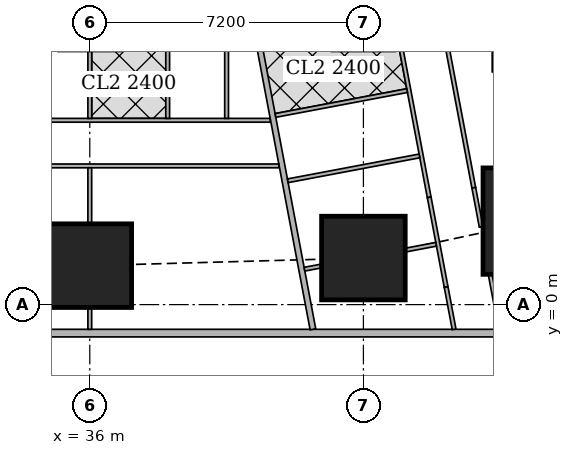
"""IFC4 building model, lengths in metres.
Left out: names, types, materials, properties, quantities, classifications, styles, units other than length and angle.
Written with IfcOpenShell. Run it as: python <this file> out.ifc"""

import sys

from ifc_helpers import new_model, si_unit, direction, frame, frame_2d, origin, origin_2d, place, context, subcontext, project, spatial, rectangle, extrude, element, fill, save


model = new_model("IFC4")
c1 = context("Model", 3, precision=1e-05, world=origin(), true_north=direction((0.0, 1.0)))
c2 = subcontext(c1, "Body", "Model", "MODEL_VIEW")
j1 = project(units=[si_unit("LENGTHUNIT", "METRE"), si_unit("PLANEANGLEUNIT", "RADIAN")], contexts=[c1])
p1 = place(None, origin())
s1 = spatial("IfcSite", under=j1, at=p1, CompositionType="ELEMENT")
p2 = place(p1, origin())
s2 = spatial("IfcBuilding", under=s1, at=p2, CompositionType="ELEMENT")
p3 = place(p2, frame((0.0, 0.0, 111.65)))
s3 = spatial("IfcBuildingStorey", under=s2, at=p3, CompositionType="ELEMENT", Elevation=111.65)
for number, where, z_axis, x_axis in (
    (1, (36.0, 1.025, 0.0), (0.0, 0.0, 1.0), (1.0, 0.0, 0.0)),
    (2, (43.2, 1.225, 0.0), (0.0, 0.0, 1.0), (1.0, 0.0, 0.0)),
):
    element("IfcColumn", number, at=place(p3, frame(where, z_axis=z_axis, x_axis=x_axis)), inside=s3, PredefinedType="COLUMN", context=c2, shape_type="SweptSolid", body=[
        extrude(rectangle(XDim=2.2, YDim=2.2, at=origin_2d()), origin(), (0.0, 0.0, 1.0), 3.75),
    ])
p4 = place(p3, frame((47.748, 2.197, 0.0), z_axis=(0.0, 0.0, 1.0), x_axis=(1.0, 0.0, 0.0)))
e3 = element("IfcColumn", 3, at=p4, inside=s3, PredefinedType="COLUMN", context=c2, shape_type="SweptSolid", body=[
    extrude(rectangle(XDim=2.8, YDim=2.8, at=origin_2d()), origin(), (0.0, 0.0, 1.0), 3.75),
])
p5 = place(p3, frame((2.163, -0.75, 0.0), z_axis=(0.0, 0.0, 1.0), x_axis=(1.0, 0.0, 0.0)))
e4 = element("IfcWall", 4, at=p5, inside=s3, PredefinedType="SOLIDWALL", context=c2, shape_type="SweptSolid", body=[
    extrude(rectangle(XDim=45.628, YDim=0.2, at=frame_2d((22.814, 0.0))), origin(), (0.0, 0.0, 1.0), 3.5),
])
p6 = place(p5, frame((9.537, 0.0, 0.9)))
e5 = element("IfcOpeningElement", 5, at=p6, cuts=e4, PredefinedType="OPENING", context=c2, shape_type="SweptSolid", body=[
    extrude(rectangle(XDim=1.8, YDim=1.5, at=frame_2d((0.9, 0.75))), frame((0.0, 0.11, 0.0), z_axis=(0.0, -1.0, 0.0), x_axis=(1.0, 0.0, 0.0)), (0.0, 0.0, 1.0), 0.22),
])
p7 = place(p5, frame((13.137, 0.0, 0.9)))
e6 = element("IfcOpeningElement", 6, at=p7, cuts=e4, PredefinedType="OPENING", context=c2, shape_type="SweptSolid", body=[
    extrude(rectangle(XDim=1.8, YDim=1.5, at=frame_2d((0.9, 0.75))), frame((0.0, 0.11, 0.0), z_axis=(0.0, -1.0, 0.0), x_axis=(1.0, 0.0, 0.0)), (0.0, 0.0, 1.0), 0.22),
])
p8 = place(p5, frame((16.737, 0.0, 0.9)))
e7 = element("IfcOpeningElement", 7, at=p8, cuts=e4, PredefinedType="OPENING", context=c2, shape_type="SweptSolid", body=[
    extrude(rectangle(XDim=1.8, YDim=1.5, at=frame_2d((0.9, 0.75))), frame((0.0, 0.11, 0.0), z_axis=(0.0, -1.0, 0.0), x_axis=(1.0, 0.0, 0.0)), (0.0, 0.0, 1.0), 0.22),
])
p9 = place(p5, frame((20.337, 0.0, 0.9)))
e8 = element("IfcOpeningElement", 8, at=p9, cuts=e4, PredefinedType="OPENING", context=c2, shape_type="SweptSolid", body=[
    extrude(rectangle(XDim=1.8, YDim=1.5, at=frame_2d((0.9, 0.75))), frame((0.0, 0.11, 0.0), z_axis=(0.0, -1.0, 0.0), x_axis=(1.0, 0.0, 0.0)), (0.0, 0.0, 1.0), 0.22),
])
p10 = place(p5, frame((23.937, 0.0, 0.9)))
e9 = element("IfcOpeningElement", 9, at=p10, cuts=e4, PredefinedType="OPENING", context=c2, shape_type="SweptSolid", body=[
    extrude(rectangle(XDim=1.8, YDim=1.5, at=frame_2d((0.9, 0.75))), frame((0.0, 0.11, 0.0), z_axis=(0.0, -1.0, 0.0), x_axis=(1.0, 0.0, 0.0)), (0.0, 0.0, 1.0), 0.22),
])
p11 = place(p5, frame((27.537, 0.0, 0.9)))
e10 = element("IfcOpeningElement", 10, at=p11, cuts=e4, PredefinedType="OPENING", context=c2, shape_type="SweptSolid", body=[
    extrude(rectangle(XDim=1.8, YDim=1.5, at=frame_2d((0.9, 0.75))), frame((0.0, 0.11, 0.0), z_axis=(0.0, -1.0, 0.0), x_axis=(1.0, 0.0, 0.0)), (0.0, 0.0, 1.0), 0.22),
])
p12 = place(p5, frame((31.137, 0.0, 0.9)))
e11 = element("IfcOpeningElement", 11, at=p12, cuts=e4, PredefinedType="OPENING", context=c2, shape_type="SweptSolid", body=[
    extrude(rectangle(XDim=1.8, YDim=1.5, at=frame_2d((0.9, 0.75))), frame((0.0, 0.11, 0.0), z_axis=(0.0, -1.0, 0.0), x_axis=(1.0, 0.0, 0.0)), (0.0, 0.0, 1.0), 0.22),
])
p13 = place(p5, frame((34.737, 0.0, 0.9)))
e12 = element("IfcOpeningElement", 12, at=p13, cuts=e4, PredefinedType="OPENING", context=c2, shape_type="SweptSolid", body=[
    extrude(rectangle(XDim=1.8, YDim=1.5, at=frame_2d((0.9, 0.75))), frame((0.0, 0.11, 0.0), z_axis=(0.0, -1.0, 0.0), x_axis=(1.0, 0.0, 0.0)), (0.0, 0.0, 1.0), 0.22),
])
p14 = place(p3, frame((50.653, 2.703, 0.0), z_axis=(0.0, 0.0, 1.0), x_axis=(-0.185612026696, 0.982623109613, 0.0)))
e13 = element("IfcWall", 13, at=p14, inside=s3, PredefinedType="SOLIDWALL", context=c2, shape_type="SweptSolid", body=[
    extrude(rectangle(XDim=41.393, YDim=0.2, at=frame_2d((20.697, 0.0))), origin(), (0.0, 0.0, 1.0), 3.5),
])
p15 = place(p14, frame((1.633, 0.0, 0.9)))
e14 = element("IfcOpeningElement", 14, at=p15, cuts=e13, PredefinedType="OPENING", context=c2, shape_type="SweptSolid", body=[
    extrude(rectangle(XDim=1.8, YDim=1.5, at=frame_2d((0.9, 0.75))), frame((0.0, 0.11, 0.0), z_axis=(0.0, -1.0, 0.0), x_axis=(1.0, 0.0, 0.0)), (0.0, 0.0, 1.0), 0.22),
])
p16 = place(p14, frame((6.032, 0.0, 0.9)))
e15 = element("IfcOpeningElement", 15, at=p16, cuts=e13, PredefinedType="OPENING", context=c2, shape_type="SweptSolid", body=[
    extrude(rectangle(XDim=1.8, YDim=1.5, at=frame_2d((0.9, 0.75))), frame((0.0, 0.11, 0.0), z_axis=(0.0, -1.0, 0.0), x_axis=(1.0, 0.0, 0.0)), (0.0, 0.0, 1.0), 0.22),
])
p17 = place(p14, frame((9.848, 0.0, 0.9)))
e16 = element("IfcOpeningElement", 16, at=p17, cuts=e13, PredefinedType="OPENING", context=c2, shape_type="SweptSolid", body=[
    extrude(rectangle(XDim=1.8, YDim=1.5, at=frame_2d((0.9, 0.75))), frame((0.0, 0.11, 0.0), z_axis=(0.0, -1.0, 0.0), x_axis=(1.0, 0.0, 0.0)), (0.0, 0.0, 1.0), 0.22),
])
p18 = place(p14, frame((13.664, 0.0, 0.9)))
e17 = element("IfcOpeningElement", 17, at=p18, cuts=e13, PredefinedType="OPENING", context=c2, shape_type="SweptSolid", body=[
    extrude(rectangle(XDim=1.8, YDim=1.5, at=frame_2d((0.9, 0.75))), frame((0.0, 0.11, 0.0), z_axis=(0.0, -1.0, 0.0), x_axis=(1.0, 0.0, 0.0)), (0.0, 0.0, 1.0), 0.22),
])
p19 = place(p14, frame((17.481, 0.0, 0.9)))
e18 = element("IfcOpeningElement", 18, at=p19, cuts=e13, PredefinedType="OPENING", context=c2, shape_type="SweptSolid", body=[
    extrude(rectangle(XDim=1.8, YDim=1.5, at=frame_2d((0.9, 0.75))), frame((0.0, 0.11, 0.0), z_axis=(0.0, -1.0, 0.0), x_axis=(1.0, 0.0, 0.0)), (0.0, 0.0, 1.0), 0.22),
])
p20 = place(p14, frame((21.297, 0.0, 0.9)))
e19 = element("IfcOpeningElement", 19, at=p20, cuts=e13, PredefinedType="OPENING", context=c2, shape_type="SweptSolid", body=[
    extrude(rectangle(XDim=1.8, YDim=1.5, at=frame_2d((0.9, 0.75))), frame((0.0, 0.11, 0.0), z_axis=(0.0, -1.0, 0.0), x_axis=(1.0, 0.0, 0.0)), (0.0, 0.0, 1.0), 0.22),
])
p21 = place(p14, frame((25.113, 0.0, 0.9)))
e20 = element("IfcOpeningElement", 20, at=p21, cuts=e13, PredefinedType="OPENING", context=c2, shape_type="SweptSolid", body=[
    extrude(rectangle(XDim=1.8, YDim=1.5, at=frame_2d((0.9, 0.75))), frame((0.0, 0.11, 0.0), z_axis=(0.0, -1.0, 0.0), x_axis=(1.0, 0.0, 0.0)), (0.0, 0.0, 1.0), 0.22),
])
p22 = place(p14, frame((28.93, 0.0, 0.9)))
e21 = element("IfcOpeningElement", 21, at=p22, cuts=e13, PredefinedType="OPENING", context=c2, shape_type="SweptSolid", body=[
    extrude(rectangle(XDim=1.8, YDim=1.5, at=frame_2d((0.9, 0.75))), frame((0.0, 0.11, 0.0), z_axis=(0.0, -1.0, 0.0), x_axis=(1.0, 0.0, 0.0)), (0.0, 0.0, 1.0), 0.22),
])
p23 = place(p14, frame((32.746, 0.0, 0.9)))
e22 = element("IfcOpeningElement", 22, at=p23, cuts=e13, PredefinedType="OPENING", context=c2, shape_type="SweptSolid", body=[
    extrude(rectangle(XDim=1.8, YDim=1.5, at=frame_2d((0.9, 0.75))), frame((0.0, 0.11, 0.0), z_axis=(0.0, -1.0, 0.0), x_axis=(1.0, 0.0, 0.0)), (0.0, 0.0, 1.0), 0.22),
])
p24 = place(p14, frame((36.481, 0.0, 0.9)))
e23 = element("IfcOpeningElement", 23, at=p24, cuts=e13, PredefinedType="OPENING", context=c2, shape_type="SweptSolid", body=[
    extrude(rectangle(XDim=1.8, YDim=1.5, at=frame_2d((0.9, 0.75))), frame((0.0, 0.11, 0.0), z_axis=(0.0, -1.0, 0.0), x_axis=(1.0, 0.0, 0.0)), (0.0, 0.0, 1.0), 0.22),
])
p25 = place(p3, frame((33.127, 45.65, 0.0), z_axis=(0.0, 0.0, 1.0), x_axis=(0.185598547723, -0.98262565562, 0.0)))
e24 = element("IfcWall", 24, at=p25, inside=s3, PredefinedType="SOLIDWALL", context=c2, shape_type="SweptSolid", body=[
    extrude(rectangle(XDim=47.118, YDim=0.15, at=frame_2d((23.559, 0.0))), origin(), (0.0, 0.0, 1.0), 2.2),
])
p26 = place(p25, frame((20.373, 0.0, 0.0)))
e25 = element("IfcOpeningElement", 25, at=p26, cuts=e24, PredefinedType="OPENING", context=c2, shape_type="SweptSolid", body=[
    extrude(rectangle(XDim=1.0, YDim=2.1, at=frame_2d((0.5, 1.05))), frame((0.0, 0.085, 0.0), z_axis=(0.0, -1.0, 0.0), x_axis=(1.0, 0.0, 0.0)), (0.0, 0.0, 1.0), 0.17),
])
p27 = place(p25, frame((24.188, 0.0, 0.0)))
e26 = element("IfcOpeningElement", 26, at=p27, cuts=e24, PredefinedType="OPENING", context=c2, shape_type="SweptSolid", body=[
    extrude(rectangle(XDim=1.0, YDim=2.1, at=frame_2d((0.5, 1.05))), frame((0.0, 0.085, 0.0), z_axis=(0.0, -1.0, 0.0), x_axis=(1.0, 0.0, 0.0)), (0.0, 0.0, 1.0), 0.17),
])
p28 = place(p25, frame((32.608, 0.0, 0.0)))
e27 = element("IfcOpeningElement", 27, at=p28, cuts=e24, PredefinedType="OPENING", context=c2, shape_type="SweptSolid", body=[
    extrude(rectangle(XDim=1.0, YDim=2.1, at=frame_2d((0.5, 1.05))), frame((0.0, 0.085, 0.0), z_axis=(0.0, -1.0, 0.0), x_axis=(1.0, 0.0, 0.0)), (0.0, 0.0, 1.0), 0.17),
])
p29 = place(p3, frame((40.974, 3.65, 0.0), z_axis=(0.0, 0.0, 1.0), x_axis=(-1.0, 0.0, 0.0)))
e28 = element("IfcWall", 28, at=p29, inside=s3, PredefinedType="PARTITIONING", context=c2, shape_type="SweptSolid", body=[
    extrude(rectangle(XDim=8.574, YDim=0.1, at=frame_2d((4.287, 0.0))), origin(), (0.0, 0.0, 1.0), 3.5),
])
p30 = place(p29, frame((6.275, 0.0, 0.0)))
e29 = element("IfcOpeningElement", 29, at=p30, cuts=e28, PredefinedType="OPENING", context=c2, shape_type="SweptSolid", body=[
    extrude(rectangle(XDim=0.9, YDim=2.1, at=frame_2d((0.45, 1.05))), frame((0.0, 0.06, 0.0), z_axis=(0.0, -1.0, 0.0), x_axis=(1.0, 0.0, 0.0)), (0.0, 0.0, 1.0), 0.12),
])
p31 = place(p29, frame((3.874, 0.0, 0.0)))
e30 = element("IfcOpeningElement", 30, at=p31, cuts=e28, PredefinedType="OPENING", context=c2, shape_type="SweptSolid", body=[
    extrude(rectangle(XDim=0.9, YDim=2.1, at=frame_2d((0.45, 1.05))), frame((0.0, 0.06, 0.0), z_axis=(0.0, -1.0, 0.0), x_axis=(1.0, 0.0, 0.0)), (0.0, 0.0, 1.0), 0.12),
])
p32 = place(p3, frame((40.747, 4.85, 0.0), z_axis=(0.0, 0.0, 1.0), x_axis=(-1.0, 0.0, 0.0)))
e31 = element("IfcWall", 31, at=p32, inside=s3, PredefinedType="PARTITIONING", context=c2, shape_type="SweptSolid", body=[
    extrude(rectangle(XDim=7.148, YDim=0.1, at=frame_2d((3.574, 0.0))), origin(), (0.0, 0.0, 1.0), 3.5),
])
p33 = place(p32, frame((5.498, 0.0, 0.0)))
e32 = element("IfcOpeningElement", 32, at=p33, cuts=e31, PredefinedType="OPENING", context=c2, shape_type="SweptSolid", body=[
    extrude(rectangle(XDim=0.9, YDim=2.1, at=frame_2d((0.45, 1.05))), frame((0.0, 0.06, 0.0), z_axis=(0.0, -1.0, 0.0), x_axis=(1.0, 0.0, 0.0)), (0.0, 0.0, 1.0), 0.12),
])
p34 = place(p32, frame((3.272, 0.0, 0.0)))
e33 = element("IfcOpeningElement", 33, at=p34, cuts=e31, PredefinedType="OPENING", context=c2, shape_type="SweptSolid", body=[
    extrude(rectangle(XDim=0.9, YDim=2.1, at=frame_2d((0.45, 1.05))), frame((0.0, 0.06, 0.0), z_axis=(0.0, -1.0, 0.0), x_axis=(1.0, 0.0, 0.0)), (0.0, 0.0, 1.0), 0.12),
])
p35 = place(p32, frame((0.15, 0.0, 0.0)))
e34 = element("IfcOpeningElement", 34, at=p35, cuts=e31, PredefinedType="OPENING", context=c2, shape_type="SweptSolid", body=[
    extrude(rectangle(XDim=0.9, YDim=2.1, at=frame_2d((0.45, 1.05))), frame((0.0, 0.06, 0.0), z_axis=(0.0, -1.0, 0.0), x_axis=(1.0, 0.0, 0.0)), (0.0, 0.0, 1.0), 0.12),
])
p36 = place(p32, frame((1.472, 0.0, 0.0)))
e35 = element("IfcOpeningElement", 35, at=p36, cuts=e31, PredefinedType="OPENING", context=c2, shape_type="SweptSolid", body=[
    extrude(rectangle(XDim=0.9, YDim=2.1, at=frame_2d((0.45, 1.05))), frame((0.0, 0.06, 0.0), z_axis=(0.0, -1.0, 0.0), x_axis=(1.0, 0.0, 0.0)), (0.0, 0.0, 1.0), 0.12),
])
p37 = place(p3, frame((36.0, -0.65, 0.0), z_axis=(0.0, 0.0, 1.0), x_axis=(0.0, 1.0, 0.0)))
e36 = element("IfcWall", 36, at=p37, inside=s3, PredefinedType="PARTITIONING", context=c2, shape_type="SweptSolid", body=[
    extrude(rectangle(XDim=0.574, YDim=0.1, at=frame_2d((0.287, 0.0))), origin(), (0.0, 0.0, 1.0), 3.5),
])
p38 = place(p3, frame((36.0, 2.126, 0.0), z_axis=(0.0, 0.0, 1.0), x_axis=(0.0, 1.0, 0.0)))
e37 = element("IfcWall", 37, at=p38, inside=s3, PredefinedType="PARTITIONING", context=c2, shape_type="SweptSolid", body=[
    extrude(rectangle(XDim=1.474, YDim=0.1, at=frame_2d((0.737, 0.0))), origin(), (0.0, 0.0, 1.0), 3.5),
])
p39 = place(p3, frame((36.0, 4.9, 0.0), z_axis=(0.0, 0.0, 1.0), x_axis=(0.0, 1.0, 0.0)))
e38 = element("IfcWall", 38, at=p39, inside=s3, PredefinedType="PARTITIONING", context=c2, shape_type="SweptSolid", body=[
    extrude(rectangle(XDim=1.799, YDim=0.1, at=frame_2d((0.899, 0.0))), origin(), (0.0, 0.0, 1.0), 3.5),
])
for number, where, z_axis, x_axis in (
    (39, (39.6, 4.9, 0.0), (0.0, 0.0, 1.0), (0.0, 1.0, 0.0)),
    (40, (38.05, 4.9, 0.0), (0.0, 0.0, 1.0), (0.0, 1.0, 0.0)),
):
    element("IfcWall", number, at=place(p3, frame(where, z_axis=z_axis, x_axis=x_axis)), inside=s3, PredefinedType="PARTITIONING", context=c2, shape_type="SweptSolid", body=[
        extrude(rectangle(XDim=3.525, YDim=0.1, at=frame_2d((1.763, 0.0))), origin(), (0.0, 0.0, 1.0), 3.5),
    ])
p40 = place(p3, frame((44.08, 13.794, 0.0), z_axis=(0.0, 0.0, 1.0), x_axis=(0.185608455357, -0.982623784212, 0.0)))
e41 = element("IfcWall", 41, at=p40, inside=s3, PredefinedType="PARTITIONING", context=c2, shape_type="SweptSolid", body=[
    extrude(rectangle(XDim=10.909, YDim=0.1, at=frame_2d((5.455, 0.0))), origin(), (0.0, 0.0, 1.0), 3.5),
])
p41 = place(p40, frame((1.094, 0.0, 0.0)))
e42 = element("IfcOpeningElement", 42, at=p41, cuts=e41, PredefinedType="OPENING", context=c2, shape_type="SweptSolid", body=[
    extrude(rectangle(XDim=0.9, YDim=2.1, at=frame_2d((0.45, 1.05))), frame((0.0, 0.06, 0.0), z_axis=(0.0, -1.0, 0.0), x_axis=(1.0, 0.0, 0.0)), (0.0, 0.0, 1.0), 0.12),
])
p42 = place(p40, frame((3.639, 0.0, 0.0)))
e43 = element("IfcOpeningElement", 43, at=p42, cuts=e41, PredefinedType="OPENING", context=c2, shape_type="SweptSolid", body=[
    extrude(rectangle(XDim=0.9, YDim=2.1, at=frame_2d((0.45, 1.05))), frame((0.0, 0.06, 0.0), z_axis=(0.0, -1.0, 0.0), x_axis=(1.0, 0.0, 0.0)), (0.0, 0.0, 1.0), 0.12),
])
p43 = place(p40, frame((8.05, 0.0, 0.0)))
e44 = element("IfcOpeningElement", 44, at=p43, cuts=e41, PredefinedType="OPENING", context=c2, shape_type="SweptSolid", body=[
    extrude(rectangle(XDim=0.9, YDim=2.1, at=frame_2d((0.45, 1.05))), frame((0.0, 0.06, 0.0), z_axis=(0.0, -1.0, 0.0), x_axis=(1.0, 0.0, 0.0)), (0.0, 0.0, 1.0), 0.12),
])
p44 = place(p3, frame((46.105, 3.074, 0.0), z_axis=(0.0, 0.0, 1.0), x_axis=(0.185727077805, -0.982601370124, 0.0)))
e45 = element("IfcWall", 45, at=p44, inside=s3, PredefinedType="PARTITIONING", context=c2, shape_type="SweptSolid", body=[
    extrude(rectangle(XDim=1.045, YDim=0.1, at=frame_2d((0.522, 0.0))), origin(), (0.0, 0.0, 1.0), 2.05),
])
p45 = place(p3, frame((46.537, 0.787, 0.0), z_axis=(0.0, 0.0, 1.0), x_axis=(0.1853166059, -0.982678866964, 0.0)))
e46 = element("IfcWall", 46, at=p45, inside=s3, PredefinedType="PARTITIONING", context=c2, shape_type="SweptSolid", body=[
    extrude(rectangle(XDim=1.462, YDim=0.1, at=frame_2d((0.731, 0.0))), origin(), (0.0, 0.0, 1.0), 2.05),
])
p46 = place(p3, frame((44.049, 7.491, 0.0), z_axis=(0.0, 0.0, 1.0), x_axis=(0.185628828844, -0.982619935632, 0.0)))
e47 = element("IfcWall", 47, at=p46, inside=s3, PredefinedType="PARTITIONING", context=c2, shape_type="SweptSolid", body=[
    extrude(rectangle(XDim=4.75, YDim=0.1, at=frame_2d((2.375, 0.0))), origin(), (0.0, 0.0, 1.0), 3.5),
])
p47 = place(p46, frame((0.8, 0.0, 0.0)))
e48 = element("IfcOpeningElement", 48, at=p47, cuts=e47, PredefinedType="OPENING", context=c2, shape_type="SweptSolid", body=[
    extrude(rectangle(XDim=0.9, YDim=2.1, at=frame_2d((0.45, 1.05))), frame((0.0, 0.06, 0.0), z_axis=(0.0, -1.0, 0.0), x_axis=(1.0, 0.0, 0.0)), (0.0, 0.0, 1.0), 0.12),
])
p48 = place(p46, frame((2.316, 0.0, 0.0)))
e49 = element("IfcOpeningElement", 49, at=p48, cuts=e47, PredefinedType="OPENING", context=c2, shape_type="SweptSolid", body=[
    extrude(rectangle(XDim=0.9, YDim=2.1, at=frame_2d((0.45, 1.05))), frame((0.0, 0.06, 0.0), z_axis=(0.0, -1.0, 0.0), x_axis=(1.0, 0.0, 0.0)), (0.0, 0.0, 1.0), 0.12),
])
p49 = place(p3, frame((44.931, 2.823, 0.0), z_axis=(0.0, 0.0, 1.0), x_axis=(0.185631845838, -0.982619365681, 0.0)))
e50 = element("IfcWall", 50, at=p49, inside=s3, PredefinedType="PARTITIONING", context=c2, shape_type="SweptSolid", body=[
    extrude(rectangle(XDim=2.403, YDim=0.1, at=frame_2d((1.201, 0.0))), origin(), (0.0, 0.0, 1.0), 2.05),
])
p50 = place(p3, frame((45.377, 0.462, 0.0), z_axis=(0.0, 0.0, 1.0), x_axis=(0.185565106588, -0.9826319714, 0.0)))
e51 = element("IfcWall", 51, at=p50, inside=s3, PredefinedType="PARTITIONING", context=c2, shape_type="SweptSolid", body=[
    extrude(rectangle(XDim=1.131, YDim=0.1, at=frame_2d((0.566, 0.0))), origin(), (0.0, 0.0, 1.0), 3.5),
])
p51 = place(p3, frame((45.114, 1.587, 0.0), z_axis=(0.0, 0.0, 1.0), x_axis=(-0.982624706348, -0.185603573443, 0.0)))
e52 = element("IfcWall", 52, at=p51, inside=s3, PredefinedType="PARTITIONING", context=c2, shape_type="SweptSolid", body=[
    extrude(rectangle(XDim=0.818, YDim=0.1, at=frame_2d((0.409, 0.0))), origin(), (0.0, 0.0, 1.0), 2.05),
])
p52 = place(p3, frame((42.09, 1.015, 0.0), z_axis=(0.0, 0.0, 1.0), x_axis=(-0.982680384557, -0.185308558375, 0.0)))
e53 = element("IfcWall", 53, at=p52, inside=s3, PredefinedType="PARTITIONING", context=c2, shape_type="SweptSolid", body=[
    extrude(rectangle(XDim=0.448, YDim=0.1, at=frame_2d((0.224, 0.0))), origin(), (0.0, 0.0, 1.0), 2.05),
])
p53 = place(p3, frame((44.35, 5.631, 0.0), z_axis=(0.0, 0.0, 1.0), x_axis=(-0.982638553676, -0.185530247748, 0.0)))
e54 = element("IfcWall", 54, at=p53, inside=s3, PredefinedType="PARTITIONING", context=c2, shape_type="SweptSolid", body=[
    extrude(rectangle(XDim=3.525, YDim=0.1, at=frame_2d((1.763, 0.0))), origin(), (0.0, 0.0, 1.0), 3.5),
])
p54 = place(p3, frame((41.21, 3.258, 0.0), z_axis=(0.0, 0.0, 1.0), x_axis=(0.982638553676, 0.185530247748, 0.0)))
e55 = element("IfcWall", 55, at=p54, inside=s3, PredefinedType="PARTITIONING", context=c2, shape_type="SweptSolid", body=[
    extrude(rectangle(XDim=3.525, YDim=0.1, at=frame_2d((1.763, 0.0))), origin(), (0.0, 0.0, 1.0), 3.5),
])
p55 = place(p54, frame((1.65, 0.0, 0.0)))
e56 = element("IfcOpeningElement", 56, at=p55, cuts=e55, PredefinedType="OPENING", context=c2, shape_type="SweptSolid", body=[
    extrude(rectangle(XDim=0.9, YDim=2.1, at=frame_2d((0.45, 1.05))), frame((0.0, 0.06, 0.0), z_axis=(0.0, -1.0, 0.0), x_axis=(1.0, 0.0, 0.0)), (0.0, 0.0, 1.0), 0.12),
])
p56 = place(p12, origin())
e57 = element("IfcWindow", 57, at=p56, inside=s3, PartitioningType="SINGLE_PANEL", PredefinedType="WINDOW", context=c2, shape_type="SweptSolid", body=[
    extrude(rectangle(XDim=1.8, YDim=1.5, at=frame_2d((0.9, 0.75))), frame((0.0, 0.03, 0.0), z_axis=(0.0, -1.0, 0.0), x_axis=(1.0, 0.0, 0.0)), (0.0, 0.0, 1.0), 0.06),
])
fill(e11, e57)
p57 = place(p13, origin())
e58 = element("IfcWindow", 58, at=p57, inside=s3, PartitioningType="SINGLE_PANEL", PredefinedType="WINDOW", context=c2, shape_type="SweptSolid", body=[
    extrude(rectangle(XDim=1.8, YDim=1.5, at=frame_2d((0.9, 0.75))), frame((0.0, 0.03, 0.0), z_axis=(0.0, -1.0, 0.0), x_axis=(1.0, 0.0, 0.0)), (0.0, 0.0, 1.0), 0.06),
])
fill(e12, e58)
p58 = place(p31, origin())
e59 = element("IfcDoor", 59, at=p58, inside=s3, OperationType="SINGLE_SWING_RIGHT", PredefinedType="DOOR", context=c2, shape_type="SweptSolid", body=[
    extrude(rectangle(XDim=0.9, YDim=2.1, at=frame_2d((0.45, 1.05))), frame((0.0, 0.025, 0.0), z_axis=(0.0, -1.0, 0.0), x_axis=(1.0, 0.0, 0.0)), (0.0, 0.0, 1.0), 0.05),
])
fill(e30, e59)
p59 = place(p33, origin())
e60 = element("IfcDoor", 60, at=p59, inside=s3, OperationType="SINGLE_SWING_LEFT", PredefinedType="DOOR", context=c2, shape_type="SweptSolid", body=[
    extrude(rectangle(XDim=0.9, YDim=2.1, at=frame_2d((0.45, 1.05))), frame((0.0, 0.025, 0.0), z_axis=(0.0, -1.0, 0.0), x_axis=(1.0, 0.0, 0.0)), (0.0, 0.0, 1.0), 0.05),
])
fill(e32, e60)
p60 = place(p34, origin())
e61 = element("IfcDoor", 61, at=p60, inside=s3, OperationType="SINGLE_SWING_RIGHT", PredefinedType="DOOR", context=c2, shape_type="SweptSolid", body=[
    extrude(rectangle(XDim=0.9, YDim=2.1, at=frame_2d((0.45, 1.05))), frame((0.0, 0.025, 0.0), z_axis=(0.0, -1.0, 0.0), x_axis=(1.0, 0.0, 0.0)), (0.0, 0.0, 1.0), 0.05),
])
fill(e33, e61)
p61 = place(p35, origin())
e62 = element("IfcDoor", 62, at=p61, inside=s3, OperationType="SINGLE_SWING_RIGHT", PredefinedType="DOOR", context=c2, shape_type="SweptSolid", body=[
    extrude(rectangle(XDim=0.9, YDim=2.1, at=frame_2d((0.45, 1.05))), frame((0.0, 0.025, 0.0), z_axis=(0.0, -1.0, 0.0), x_axis=(1.0, 0.0, 0.0)), (0.0, 0.0, 1.0), 0.05),
])
fill(e34, e62)
p62 = place(p36, origin())
e63 = element("IfcDoor", 63, at=p62, inside=s3, OperationType="SINGLE_SWING_LEFT", PredefinedType="DOOR", context=c2, shape_type="SweptSolid", body=[
    extrude(rectangle(XDim=0.9, YDim=2.1, at=frame_2d((0.45, 1.05))), frame((0.0, 0.025, 0.0), z_axis=(0.0, -1.0, 0.0), x_axis=(1.0, 0.0, 0.0)), (0.0, 0.0, 1.0), 0.05),
])
fill(e35, e63)
p63 = place(p43, origin())
e64 = element("IfcDoor", 64, at=p63, inside=s3, OperationType="SINGLE_SWING_LEFT", PredefinedType="DOOR", context=c2, shape_type="SweptSolid", body=[
    extrude(rectangle(XDim=0.9, YDim=2.1, at=frame_2d((0.45, 1.05))), frame((0.0, 0.025, 0.0), z_axis=(0.0, -1.0, 0.0), x_axis=(1.0, 0.0, 0.0)), (0.0, 0.0, 1.0), 0.05),
])
fill(e44, e64)
p64 = place(p47, origin())
e65 = element("IfcDoor", 65, at=p64, inside=s3, OperationType="SINGLE_SWING_LEFT", PredefinedType="DOOR", context=c2, shape_type="SweptSolid", body=[
    extrude(rectangle(XDim=0.9, YDim=2.1, at=frame_2d((0.45, 1.05))), frame((0.0, 0.025, 0.0), z_axis=(0.0, -1.0, 0.0), x_axis=(1.0, 0.0, 0.0)), (0.0, 0.0, 1.0), 0.05),
])
fill(e48, e65)
p65 = place(p48, origin())
e66 = element("IfcDoor", 66, at=p65, inside=s3, OperationType="SINGLE_SWING_LEFT", PredefinedType="DOOR", context=c2, shape_type="SweptSolid", body=[
    extrude(rectangle(XDim=0.9, YDim=2.1, at=frame_2d((0.45, 1.05))), frame((0.0, 0.025, 0.0), z_axis=(0.0, -1.0, 0.0), x_axis=(1.0, 0.0, 0.0)), (0.0, 0.0, 1.0), 0.05),
])
fill(e49, e66)
p66 = place(p55, origin())
e67 = element("IfcDoor", 67, at=p66, inside=s3, OperationType="SINGLE_SWING_RIGHT", PredefinedType="DOOR", context=c2, shape_type="SweptSolid", body=[
    extrude(rectangle(XDim=0.9, YDim=2.1, at=frame_2d((0.45, 1.05))), frame((0.0, 0.025, 0.0), z_axis=(0.0, -1.0, 0.0), x_axis=(1.0, 0.0, 0.0)), (0.0, 0.0, 1.0), 0.05),
])
fill(e56, e67)
save(model, sys.argv[1])
